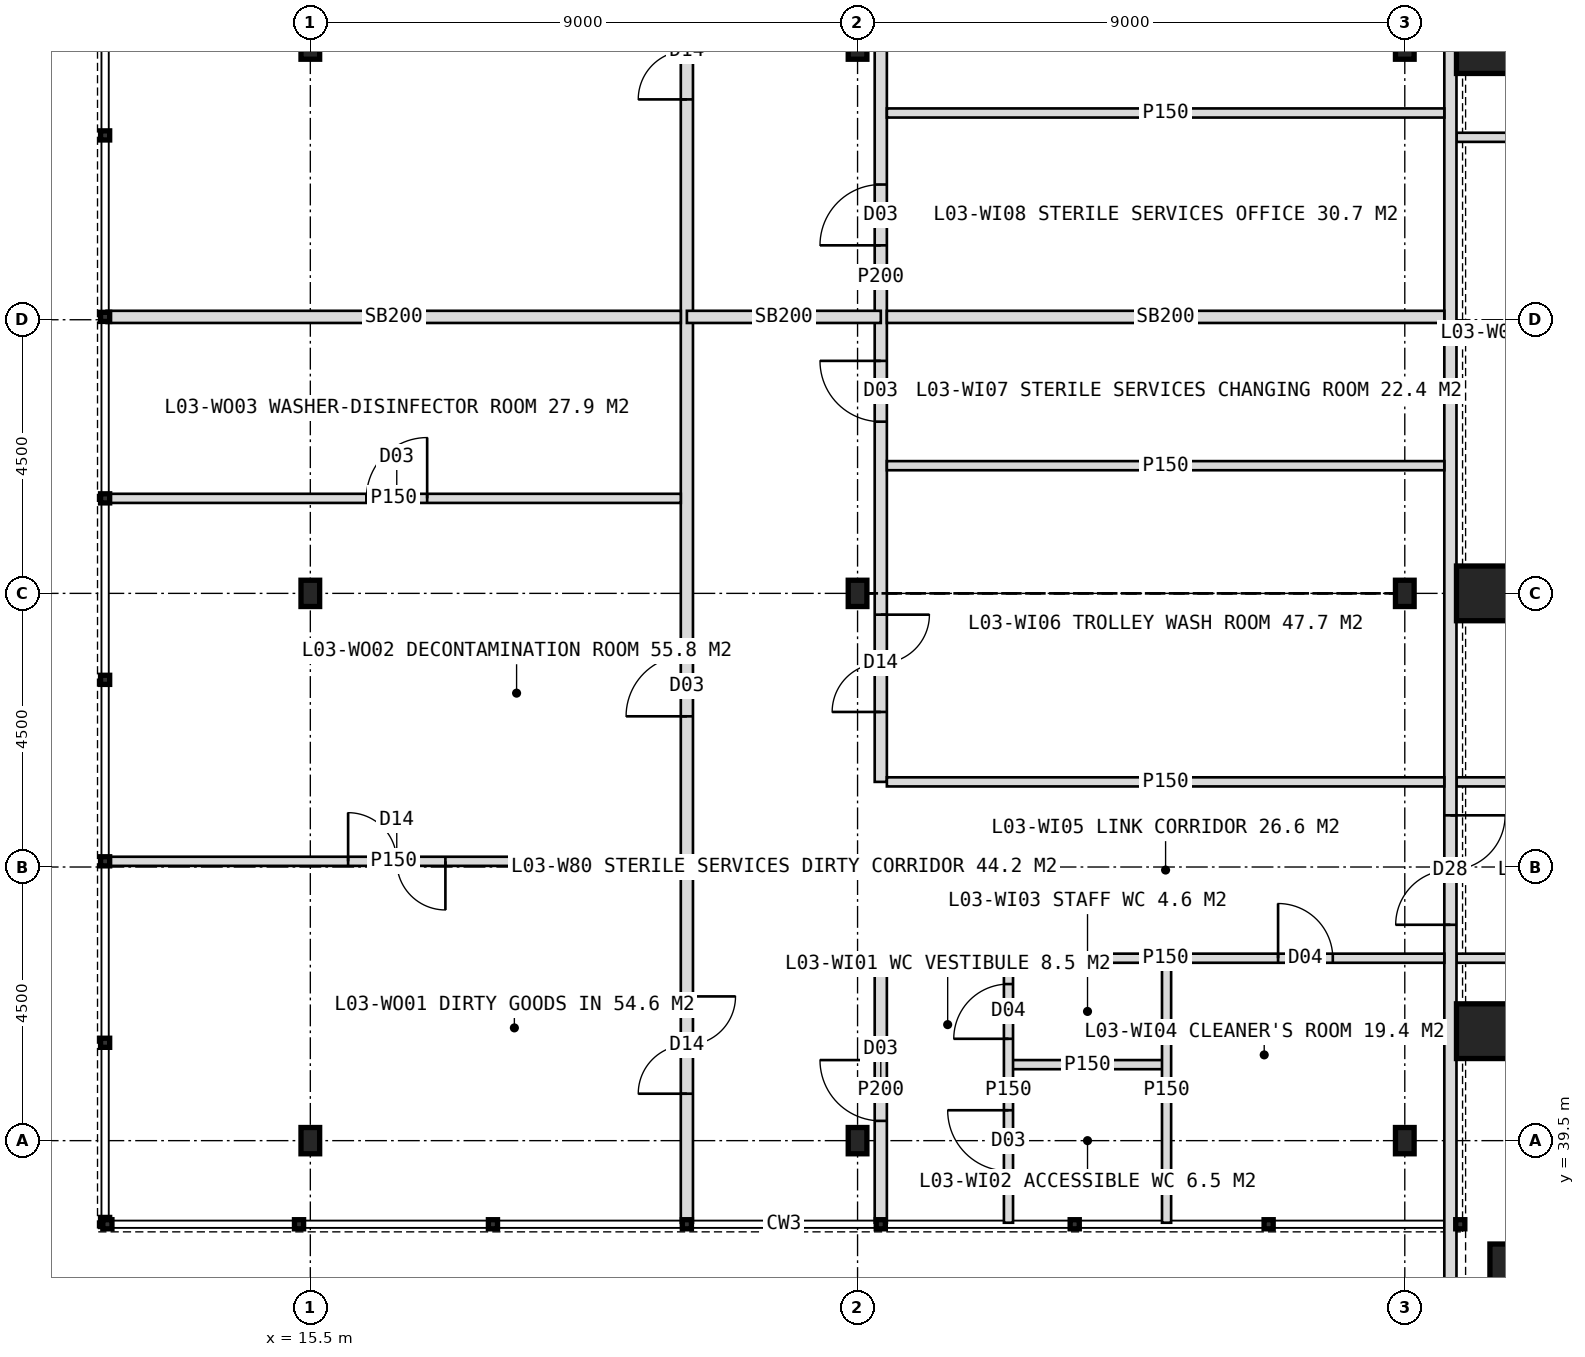
"""IFC4 building model, lengths in metres.
Left out: names, types, materials, properties, quantities, classifications, styles, units other than length and angle.
Written with IfcOpenShell. Run it as: python <this file> out.ifc"""

import sys

from ifc_helpers import new_model, si_unit, direction, frame, frame_2d, origin, origin_2d, place, context, subcontext, project, spatial, rectangle, hollow_rectangle, i_section, extrude, element, fill, save


model = new_model("IFC4")
c1 = context("Model", 3, precision=1e-05, world=origin(), true_north=direction((0.0, 1.0)))
c2 = subcontext(c1, "Body", "Model", "MODEL_VIEW")
j1 = project(units=[si_unit("LENGTHUNIT", "METRE"), si_unit("PLANEANGLEUNIT", "RADIAN")], contexts=[c1])
p1 = place(None, origin())
s1 = spatial("IfcSite", under=j1, at=p1, CompositionType="ELEMENT")
p2 = place(p1, origin())
s2 = spatial("IfcBuilding", under=s1, at=p2, CompositionType="ELEMENT")
p3 = place(p2, frame((0.0, 0.0, 16.5)))
s3 = spatial("IfcBuildingStorey", under=s2, at=p3, CompositionType="ELEMENT", Elevation=16.5)
for number, where, z_axis, x_axis in (
    (1, (34.8, 41.3, 0.0), (0.0, 0.0, 1.0), (1.0, 0.0, 0.0)),
    (2, (34.8, 48.5, 0.0), (0.0, 0.0, 1.0), (1.0, 0.0, 0.0)),
    (3, (34.8, 57.5, 0.0), (0.0, 0.0, 1.0), (1.0, 0.0, 0.0)),
    (4, (35.35, 37.35, 0.0), (0.0, 0.0, 1.0), (1.0, 0.0, 0.0)),
):
    element("IfcColumn", number, at=place(p3, frame(where, z_axis=z_axis, x_axis=x_axis)), inside=s3, PredefinedType="COLUMN", context=c2, shape_type="SweptSolid", body=[
        extrude(hollow_rectangle(XDim=0.9, YDim=0.9, WallThickness=0.08, at=origin_2d()), origin(), (0.0, 0.0, 1.0), 4.5),
    ])
for number, where, z_axis, x_axis in (
    (5, (15.5, 39.5, 0.0), (0.0, 0.0, 1.0), (1.0, 0.0, 0.0)),
    (6, (15.5, 48.5, 0.0), (0.0, 0.0, 1.0), (1.0, 0.0, 0.0)),
    (7, (15.5, 57.5, 0.0), (0.0, 0.0, 1.0), (1.0, 0.0, 0.0)),
    (8, (24.5, 39.5, 0.0), (0.0, 0.0, 1.0), (1.0, 0.0, 0.0)),
    (9, (24.5, 48.5, 0.0), (0.0, 0.0, 1.0), (1.0, 0.0, 0.0)),
    (10, (24.5, 57.5, 0.0), (0.0, 0.0, 1.0), (1.0, 0.0, 0.0)),
    (11, (33.5, 39.5, 0.0), (0.0, 0.0, 1.0), (1.0, 0.0, 0.0)),
    (12, (33.5, 48.5, 0.0), (0.0, 0.0, 1.0), (1.0, 0.0, 0.0)),
    (13, (33.5, 57.5, 0.0), (0.0, 0.0, 1.0), (1.0, 0.0, 0.0)),
):
    element("IfcColumn", number, at=place(p3, frame(where, z_axis=z_axis, x_axis=x_axis)), inside=s3, PredefinedType="COLUMN", context=c2, shape_type="SweptSolid", body=[
        extrude(i_section(OverallWidth=0.307, OverallDepth=0.432, WebThickness=0.021, FlangeThickness=0.04, FilletRadius=0.027, at=origin_2d()), origin(), (0.0, 0.0, 1.0), 4.5),
    ])
for number, where, z_axis, x_axis in (
    (14, (40.5, 42.5, 0.0), (0.0, 0.0, 1.0), (-1.0, 0.0, 0.0)),
    (15, (40.5, 45.4, 0.0), (0.0, 0.0, 1.0), (-1.0, 0.0, 0.0)),
    (16, (40.5, 56.0, 0.0), (0.0, 0.0, 1.0), (-1.0, 0.0, 0.0)),
):
    element("IfcWall", number, at=place(p3, frame(where, z_axis=z_axis, x_axis=x_axis)), inside=s3, PredefinedType="PARTITIONING", context=c2, shape_type="SweptSolid", body=[
        extrude(rectangle(XDim=6.15, YDim=0.15, at=frame_2d((3.075, 0.0))), origin(), (0.0, 0.0, 1.0), 4.2),
    ])
p4 = place(p3, frame((21.693, 38.15, 0.0), z_axis=(0.0, 0.0, 1.0), x_axis=(0.0, 1.0, 0.0)))
e17 = element("IfcWall", 17, at=p4, inside=s3, PredefinedType="PARTITIONING", context=c2, shape_type="SweptSolid", body=[
    extrude(rectangle(XDim=47.7, YDim=0.2, at=frame_2d((23.85, 0.0))), origin(), (0.0, 0.0, 1.0), 4.2),
])
p5 = place(p4, frame((45.7, 0.0, 0.0)))
e18 = element("IfcOpeningElement", 18, at=p5, cuts=e17, PredefinedType="OPENING", context=c2, shape_type="SweptSolid", body=[
    extrude(rectangle(XDim=1.2, YDim=2.1, at=frame_2d((0.6, 1.05))), frame((0.0, 0.11, 0.0), z_axis=(0.0, -1.0, 0.0), x_axis=(1.0, 0.0, 0.0)), (0.0, 0.0, 1.0), 0.22),
])
p6 = place(p4, frame((36.244, 0.0, 0.0)))
e19 = element("IfcOpeningElement", 19, at=p6, cuts=e17, PredefinedType="OPENING", context=c2, shape_type="SweptSolid", body=[
    extrude(rectangle(XDim=1.0, YDim=2.1, at=frame_2d((0.5, 1.05))), frame((0.0, 0.11, 0.0), z_axis=(0.0, -1.0, 0.0), x_axis=(1.0, 0.0, 0.0)), (0.0, 0.0, 1.0), 0.22),
])
p7 = place(p4, frame((2.122, 0.0, 0.0)))
e20 = element("IfcOpeningElement", 20, at=p7, cuts=e17, PredefinedType="OPENING", context=c2, shape_type="SweptSolid", body=[
    extrude(rectangle(XDim=1.6, YDim=2.2, at=frame_2d((0.8, 1.1))), frame((0.0, 0.11, 0.0), z_axis=(0.0, -1.0, 0.0), x_axis=(1.0, 0.0, 0.0)), (0.0, 0.0, 1.0), 0.22),
])
p8 = place(p4, frame((8.328, 0.0, 0.0)))
e21 = element("IfcOpeningElement", 21, at=p8, cuts=e17, PredefinedType="OPENING", context=c2, shape_type="SweptSolid", body=[
    extrude(rectangle(XDim=1.0, YDim=2.1, at=frame_2d((0.5, 1.05))), frame((0.0, 0.11, 0.0), z_axis=(0.0, -1.0, 0.0), x_axis=(1.0, 0.0, 0.0)), (0.0, 0.0, 1.0), 0.22),
])
p9 = place(p4, frame((18.473, 0.0, 0.0)))
e22 = element("IfcOpeningElement", 22, at=p9, cuts=e17, PredefinedType="OPENING", context=c2, shape_type="SweptSolid", body=[
    extrude(rectangle(XDim=1.6, YDim=2.2, at=frame_2d((0.8, 1.1))), frame((0.0, 0.11, 0.0), z_axis=(0.0, -1.0, 0.0), x_axis=(1.0, 0.0, 0.0)), (0.0, 0.0, 1.0), 0.22),
])
p10 = place(p4, frame((30.411, 0.0, 0.0)))
e23 = element("IfcOpeningElement", 23, at=p10, cuts=e17, PredefinedType="OPENING", context=c2, shape_type="SweptSolid", body=[
    extrude(rectangle(XDim=1.6, YDim=2.2, at=frame_2d((0.8, 1.1))), frame((0.0, 0.11, 0.0), z_axis=(0.0, -1.0, 0.0), x_axis=(1.0, 0.0, 0.0)), (0.0, 0.0, 1.0), 0.22),
])
p11 = place(p3, frame((24.882, 38.15, 0.0), z_axis=(0.0, 0.0, 1.0), x_axis=(0.0, 1.0, 0.0)))
e24 = element("IfcWall", 24, at=p11, inside=s3, PredefinedType="PARTITIONING", context=c2, shape_type="SweptSolid", body=[
    extrude(rectangle(XDim=4.35, YDim=0.2, at=frame_2d((2.175, 0.0))), origin(), (0.0, 0.0, 1.0), 4.2),
])
p12 = place(p11, frame((1.675, 0.0, 0.0)))
e25 = element("IfcOpeningElement", 25, at=p12, cuts=e24, PredefinedType="OPENING", context=c2, shape_type="SweptSolid", body=[
    extrude(rectangle(XDim=1.0, YDim=2.1, at=frame_2d((0.5, 1.05))), frame((0.0, 0.11, 0.0), z_axis=(0.0, -1.0, 0.0), x_axis=(1.0, 0.0, 0.0)), (0.0, 0.0, 1.0), 0.22),
])
p13 = place(p3, frame((24.882, 45.4, 0.0), z_axis=(0.0, 0.0, 1.0), x_axis=(0.0, 1.0, 0.0)))
e26 = element("IfcWall", 26, at=p13, inside=s3, PredefinedType="PARTITIONING", context=c2, shape_type="SweptSolid", body=[
    extrude(rectangle(XDim=16.6, YDim=0.2, at=frame_2d((8.3, 0.0))), origin(), (0.0, 0.0, 1.0), 4.2),
])
p14 = place(p13, frame((1.15, 0.0, 0.0)))
e27 = element("IfcOpeningElement", 27, at=p14, cuts=e26, PredefinedType="OPENING", context=c2, shape_type="SweptSolid", body=[
    extrude(rectangle(XDim=1.6, YDim=2.2, at=frame_2d((0.8, 1.1))), frame((0.0, 0.11, 0.0), z_axis=(0.0, -1.0, 0.0), x_axis=(1.0, 0.0, 0.0)), (0.0, 0.0, 1.0), 0.22),
])
p15 = place(p13, frame((5.924, 0.0, 0.0)))
e28 = element("IfcOpeningElement", 28, at=p15, cuts=e26, PredefinedType="OPENING", context=c2, shape_type="SweptSolid", body=[
    extrude(rectangle(XDim=1.0, YDim=2.1, at=frame_2d((0.5, 1.05))), frame((0.0, 0.11, 0.0), z_axis=(0.0, -1.0, 0.0), x_axis=(1.0, 0.0, 0.0)), (0.0, 0.0, 1.0), 0.22),
])
p16 = place(p13, frame((8.823, 0.0, 0.0)))
e29 = element("IfcOpeningElement", 29, at=p16, cuts=e26, PredefinedType="OPENING", context=c2, shape_type="SweptSolid", body=[
    extrude(rectangle(XDim=1.0, YDim=2.1, at=frame_2d((0.5, 1.05))), frame((0.0, 0.11, 0.0), z_axis=(0.0, -1.0, 0.0), x_axis=(1.0, 0.0, 0.0)), (0.0, 0.0, 1.0), 0.22),
])
p17 = place(p13, frame((13.0, 0.0, 0.0)))
e30 = element("IfcOpeningElement", 30, at=p17, cuts=e26, PredefinedType="OPENING", context=c2, shape_type="SweptSolid", body=[
    extrude(rectangle(XDim=1.6, YDim=2.2, at=frame_2d((0.8, 1.1))), frame((0.0, 0.11, 0.0), z_axis=(0.0, -1.0, 0.0), x_axis=(1.0, 0.0, 0.0)), (0.0, 0.0, 1.0), 0.22),
])
p18 = place(p3, frame((21.693, 53.047, 0.0), z_axis=(0.0, 0.0, 1.0), x_axis=(1.0, 0.0, 0.0)))
e31 = element("IfcWall", 31, at=p18, inside=s3, PredefinedType="SOLIDWALL", context=c2, shape_type="SweptSolid", body=[
    extrude(rectangle(XDim=3.189, YDim=0.2, at=frame_2d((1.594, 0.0))), origin(), (0.0, 0.0, 1.0), 4.2),
])
p19 = place(p3, frame((34.25, 36.8, 0.0), z_axis=(0.0, 0.0, 1.0), x_axis=(0.0, 1.0, 0.0)))
e32 = element("IfcWall", 32, at=p19, inside=s3, PredefinedType="SOLIDWALL", context=c2, shape_type="SweptSolid", body=[
    extrude(rectangle(XDim=50.4, YDim=0.2, at=frame_2d((25.2, 0.0))), origin(), (0.0, 0.0, 1.0), 4.2),
])
p20 = place(p19, frame((6.25, 0.0, 0.0)))
e33 = element("IfcOpeningElement", 33, at=p20, cuts=e32, PredefinedType="OPENING", context=c2, shape_type="SweptSolid", body=[
    extrude(rectangle(XDim=1.8, YDim=2.2, at=frame_2d((0.9, 1.1))), frame((0.0, 0.11, 0.0), z_axis=(0.0, -1.0, 0.0), x_axis=(1.0, 0.0, 0.0)), (0.0, 0.0, 1.0), 0.22),
])
p21 = place(p19, frame((25.55, 0.0, 0.0)))
e34 = element("IfcOpeningElement", 34, at=p21, cuts=e32, PredefinedType="OPENING", context=c2, shape_type="SweptSolid", body=[
    extrude(rectangle(XDim=1.8, YDim=2.2, at=frame_2d((0.9, 1.1))), frame((0.0, 0.11, 0.0), z_axis=(0.0, -1.0, 0.0), x_axis=(1.0, 0.0, 0.0)), (0.0, 0.0, 1.0), 0.22),
])
p22 = place(p3, frame((12.15, 44.094, 0.0), z_axis=(0.0, 0.0, 1.0), x_axis=(1.0, 0.0, 0.0)))
e35 = element("IfcWall", 35, at=p22, inside=s3, PredefinedType="PARTITIONING", context=c2, shape_type="SweptSolid", body=[
    extrude(rectangle(XDim=9.443, YDim=0.15, at=frame_2d((4.722, 0.0))), origin(), (0.0, 0.0, 1.0), 4.2),
])
p23 = place(p22, frame((3.971, 0.0, 0.0)))
e36 = element("IfcOpeningElement", 36, at=p23, cuts=e35, PredefinedType="OPENING", context=c2, shape_type="SweptSolid", body=[
    extrude(rectangle(XDim=1.6, YDim=2.2, at=frame_2d((0.8, 1.1))), frame((0.0, 0.085, 0.0), z_axis=(0.0, -1.0, 0.0), x_axis=(1.0, 0.0, 0.0)), (0.0, 0.0, 1.0), 0.17),
])
p24 = place(p3, frame((12.15, 50.062, 0.0), z_axis=(0.0, 0.0, 1.0), x_axis=(1.0, 0.0, 0.0)))
e37 = element("IfcWall", 37, at=p24, inside=s3, PredefinedType="PARTITIONING", context=c2, shape_type="SweptSolid", body=[
    extrude(rectangle(XDim=9.443, YDim=0.15, at=frame_2d((4.722, 0.0))), origin(), (0.0, 0.0, 1.0), 4.2),
])
p25 = place(p24, frame((4.271, 0.0, 0.0)))
e38 = element("IfcOpeningElement", 38, at=p25, cuts=e37, PredefinedType="OPENING", context=c2, shape_type="SweptSolid", body=[
    extrude(rectangle(XDim=1.0, YDim=2.1, at=frame_2d((0.5, 1.05))), frame((0.0, 0.085, 0.0), z_axis=(0.0, -1.0, 0.0), x_axis=(1.0, 0.0, 0.0)), (0.0, 0.0, 1.0), 0.17),
])
p26 = place(p3, frame((12.15, 53.047, 0.0), z_axis=(0.0, 0.0, 1.0), x_axis=(1.0, 0.0, 0.0)))
e39 = element("IfcWall", 39, at=p26, inside=s3, PredefinedType="SOLIDWALL", context=c2, shape_type="SweptSolid", body=[
    extrude(rectangle(XDim=9.443, YDim=0.2, at=frame_2d((4.722, 0.0))), origin(), (0.0, 0.0, 1.0), 4.2),
])
p27 = place(p3, frame((26.982, 40.75, 0.0), z_axis=(0.0, 0.0, 1.0), x_axis=(1.0, 0.0, 0.0)))
e40 = element("IfcWall", 40, at=p27, inside=s3, PredefinedType="PARTITIONING", context=c2, shape_type="SweptSolid", body=[
    extrude(rectangle(XDim=2.6, YDim=0.15, at=frame_2d((1.3, 0.0))), origin(), (0.0, 0.0, 1.0), 4.2),
])
p28 = place(p3, frame((24.982, 42.5, 0.0), z_axis=(0.0, 0.0, 1.0), x_axis=(1.0, 0.0, 0.0)))
e41 = element("IfcWall", 41, at=p28, inside=s3, PredefinedType="PARTITIONING", context=c2, shape_type="SweptSolid", body=[
    extrude(rectangle(XDim=9.168, YDim=0.15, at=frame_2d((4.584, 0.0))), origin(), (0.0, 0.0, 1.0), 4.2),
])
p29 = place(p28, frame((6.434, 0.0, 0.0)))
e42 = element("IfcOpeningElement", 42, at=p29, cuts=e41, PredefinedType="OPENING", context=c2, shape_type="SweptSolid", body=[
    extrude(rectangle(XDim=0.9, YDim=2.1, at=frame_2d((0.45, 1.05))), frame((0.0, 0.085, 0.0), z_axis=(0.0, -1.0, 0.0), x_axis=(1.0, 0.0, 0.0)), (0.0, 0.0, 1.0), 0.17),
])
for number, where, z_axis, x_axis in (
    (43, (24.982, 45.4, 0.0), (0.0, 0.0, 1.0), (1.0, 0.0, 0.0)),
    (44, (24.982, 50.6, 0.0), (0.0, 0.0, 1.0), (1.0, 0.0, 0.0)),
):
    element("IfcWall", number, at=place(p3, frame(where, z_axis=z_axis, x_axis=x_axis)), inside=s3, PredefinedType="PARTITIONING", context=c2, shape_type="SweptSolid", body=[
        extrude(rectangle(XDim=9.168, YDim=0.15, at=frame_2d((4.584, 0.0))), origin(), (0.0, 0.0, 1.0), 4.2),
    ])
p30 = place(p3, frame((24.982, 53.047, 0.0), z_axis=(0.0, 0.0, 1.0), x_axis=(1.0, 0.0, 0.0)))
e45 = element("IfcWall", 45, at=p30, inside=s3, PredefinedType="SOLIDWALL", context=c2, shape_type="SweptSolid", body=[
    extrude(rectangle(XDim=9.168, YDim=0.2, at=frame_2d((4.584, 0.0))), origin(), (0.0, 0.0, 1.0), 4.2),
])
p31 = place(p3, frame((24.982, 56.4, 0.0), z_axis=(0.0, 0.0, 1.0), x_axis=(1.0, 0.0, 0.0)))
e46 = element("IfcWall", 46, at=p31, inside=s3, PredefinedType="PARTITIONING", context=c2, shape_type="SweptSolid", body=[
    extrude(rectangle(XDim=9.168, YDim=0.15, at=frame_2d((4.584, 0.0))), origin(), (0.0, 0.0, 1.0), 4.2),
])
p32 = place(p3, frame((26.982, 38.15, 0.0), z_axis=(0.0, 0.0, 1.0), x_axis=(0.0, 1.0, 0.0)))
e47 = element("IfcWall", 47, at=p32, inside=s3, PredefinedType="PARTITIONING", context=c2, shape_type="SweptSolid", body=[
    extrude(rectangle(XDim=4.35, YDim=0.15, at=frame_2d((2.175, 0.0))), origin(), (0.0, 0.0, 1.0), 4.2),
])
p33 = place(p32, frame((0.85, 0.0, 0.0)))
e48 = element("IfcOpeningElement", 48, at=p33, cuts=e47, PredefinedType="OPENING", context=c2, shape_type="SweptSolid", body=[
    extrude(rectangle(XDim=1.0, YDim=2.1, at=frame_2d((0.5, 1.05))), frame((0.0, 0.085, 0.0), z_axis=(0.0, -1.0, 0.0), x_axis=(1.0, 0.0, 0.0)), (0.0, 0.0, 1.0), 0.17),
])
p34 = place(p32, frame((3.025, 0.0, 0.0)))
e49 = element("IfcOpeningElement", 49, at=p34, cuts=e47, PredefinedType="OPENING", context=c2, shape_type="SweptSolid", body=[
    extrude(rectangle(XDim=0.9, YDim=2.1, at=frame_2d((0.45, 1.05))), frame((0.0, 0.085, 0.0), z_axis=(0.0, -1.0, 0.0), x_axis=(1.0, 0.0, 0.0)), (0.0, 0.0, 1.0), 0.17),
])
p35 = place(p3, frame((29.582, 38.15, 0.0), z_axis=(0.0, 0.0, 1.0), x_axis=(0.0, 1.0, 0.0)))
e50 = element("IfcWall", 50, at=p35, inside=s3, PredefinedType="PARTITIONING", context=c2, shape_type="SweptSolid", body=[
    extrude(rectangle(XDim=4.35, YDim=0.15, at=frame_2d((2.175, 0.0))), origin(), (0.0, 0.0, 1.0), 4.2),
])
p36 = place(p20, origin())
e51 = element("IfcDoor", 51, at=p36, inside=s3, OperationType="DOUBLE_DOOR_SINGLE_SWING", PredefinedType="DOOR", context=c2, shape_type="SweptSolid", body=[
    extrude(rectangle(XDim=1.8, YDim=2.2, at=frame_2d((0.9, 1.1))), frame((0.0, 0.025, 0.0), z_axis=(0.0, -1.0, 0.0), x_axis=(1.0, 0.0, 0.0)), (0.0, 0.0, 1.0), 0.05),
])
fill(e33, e51)
p37 = place(p7, origin())
e52 = element("IfcDoor", 52, at=p37, inside=s3, OperationType="DOUBLE_DOOR_DOUBLE_SWING", PredefinedType="DOOR", context=c2, shape_type="SweptSolid", body=[
    extrude(rectangle(XDim=1.6, YDim=2.2, at=frame_2d((0.8, 1.1))), frame((0.0, 0.025, 0.0), z_axis=(0.0, -1.0, 0.0), x_axis=(1.0, 0.0, 0.0)), (0.0, 0.0, 1.0), 0.05),
])
fill(e20, e52)
p38 = place(p8, origin())
e53 = element("IfcDoor", 53, at=p38, inside=s3, OperationType="SINGLE_SWING_LEFT", PredefinedType="DOOR", context=c2, shape_type="SweptSolid", body=[
    extrude(rectangle(XDim=1.0, YDim=2.1, at=frame_2d((0.5, 1.05))), frame((0.0, 0.025, 0.0), z_axis=(0.0, -1.0, 0.0), x_axis=(1.0, 0.0, 0.0)), (0.0, 0.0, 1.0), 0.05),
])
fill(e21, e53)
p39 = place(p23, origin())
e54 = element("IfcDoor", 54, at=p39, inside=s3, OperationType="DOUBLE_DOOR_DOUBLE_SWING", PredefinedType="DOOR", context=c2, shape_type="SweptSolid", body=[
    extrude(rectangle(XDim=1.6, YDim=2.2, at=frame_2d((0.8, 1.1))), frame((0.0, 0.025, 0.0), z_axis=(0.0, -1.0, 0.0), x_axis=(1.0, 0.0, 0.0)), (0.0, 0.0, 1.0), 0.05),
])
fill(e36, e54)
p40 = place(p25, origin())
e55 = element("IfcDoor", 55, at=p40, inside=s3, OperationType="SINGLE_SWING_RIGHT", PredefinedType="DOOR", context=c2, shape_type="SweptSolid", body=[
    extrude(rectangle(XDim=1.0, YDim=2.1, at=frame_2d((0.5, 1.05))), frame((0.0, 0.025, 0.0), z_axis=(0.0, -1.0, 0.0), x_axis=(1.0, 0.0, 0.0)), (0.0, 0.0, 1.0), 0.05),
])
fill(e38, e55)
p41 = place(p9, origin())
e56 = element("IfcDoor", 56, at=p41, inside=s3, OperationType="DOUBLE_DOOR_DOUBLE_SWING", PredefinedType="DOOR", context=c2, shape_type="SweptSolid", body=[
    extrude(rectangle(XDim=1.6, YDim=2.2, at=frame_2d((0.8, 1.1))), frame((0.0, 0.025, 0.0), z_axis=(0.0, -1.0, 0.0), x_axis=(1.0, 0.0, 0.0)), (0.0, 0.0, 1.0), 0.05),
])
fill(e22, e56)
p42 = place(p12, origin())
e57 = element("IfcDoor", 57, at=p42, inside=s3, OperationType="SINGLE_SWING_RIGHT", PredefinedType="DOOR", context=c2, shape_type="SweptSolid", body=[
    extrude(rectangle(XDim=1.0, YDim=2.1, at=frame_2d((0.5, 1.05))), frame((0.0, 0.025, 0.0), z_axis=(0.0, -1.0, 0.0), x_axis=(1.0, 0.0, 0.0)), (0.0, 0.0, 1.0), 0.05),
])
fill(e25, e57)
p43 = place(p33, origin())
e58 = element("IfcDoor", 58, at=p43, inside=s3, OperationType="SINGLE_SWING_RIGHT", PredefinedType="DOOR", context=c2, shape_type="SweptSolid", body=[
    extrude(rectangle(XDim=1.0, YDim=2.1, at=frame_2d((0.5, 1.05))), frame((0.0, 0.025, 0.0), z_axis=(0.0, -1.0, 0.0), x_axis=(1.0, 0.0, 0.0)), (0.0, 0.0, 1.0), 0.05),
])
fill(e48, e58)
p44 = place(p34, origin())
e59 = element("IfcDoor", 59, at=p44, inside=s3, OperationType="SINGLE_SWING_LEFT", PredefinedType="DOOR", context=c2, shape_type="SweptSolid", body=[
    extrude(rectangle(XDim=0.9, YDim=2.1, at=frame_2d((0.45, 1.05))), frame((0.0, 0.025, 0.0), z_axis=(0.0, -1.0, 0.0), x_axis=(1.0, 0.0, 0.0)), (0.0, 0.0, 1.0), 0.05),
])
fill(e49, e59)
p45 = place(p29, origin())
e60 = element("IfcDoor", 60, at=p45, inside=s3, OperationType="SINGLE_SWING_LEFT", PredefinedType="DOOR", context=c2, shape_type="SweptSolid", body=[
    extrude(rectangle(XDim=0.9, YDim=2.1, at=frame_2d((0.45, 1.05))), frame((0.0, 0.025, 0.0), z_axis=(0.0, -1.0, 0.0), x_axis=(1.0, 0.0, 0.0)), (0.0, 0.0, 1.0), 0.05),
])
fill(e42, e60)
p46 = place(p14, origin())
e61 = element("IfcDoor", 61, at=p46, inside=s3, OperationType="DOUBLE_DOOR_DOUBLE_SWING", PredefinedType="DOOR", context=c2, shape_type="SweptSolid", body=[
    extrude(rectangle(XDim=1.6, YDim=2.2, at=frame_2d((0.8, 1.1))), frame((0.0, 0.025, 0.0), z_axis=(0.0, -1.0, 0.0), x_axis=(1.0, 0.0, 0.0)), (0.0, 0.0, 1.0), 0.05),
])
fill(e27, e61)
p47 = place(p15, origin())
e62 = element("IfcDoor", 62, at=p47, inside=s3, OperationType="SINGLE_SWING_RIGHT", PredefinedType="DOOR", context=c2, shape_type="SweptSolid", body=[
    extrude(rectangle(XDim=1.0, YDim=2.1, at=frame_2d((0.5, 1.05))), frame((0.0, 0.025, 0.0), z_axis=(0.0, -1.0, 0.0), x_axis=(1.0, 0.0, 0.0)), (0.0, 0.0, 1.0), 0.05),
])
fill(e28, e62)
p48 = place(p16, origin())
e63 = element("IfcDoor", 63, at=p48, inside=s3, OperationType="SINGLE_SWING_LEFT", PredefinedType="DOOR", context=c2, shape_type="SweptSolid", body=[
    extrude(rectangle(XDim=1.0, YDim=2.1, at=frame_2d((0.5, 1.05))), frame((0.0, 0.025, 0.0), z_axis=(0.0, -1.0, 0.0), x_axis=(1.0, 0.0, 0.0)), (0.0, 0.0, 1.0), 0.05),
])
fill(e29, e63)
save(model, sys.argv[1])
